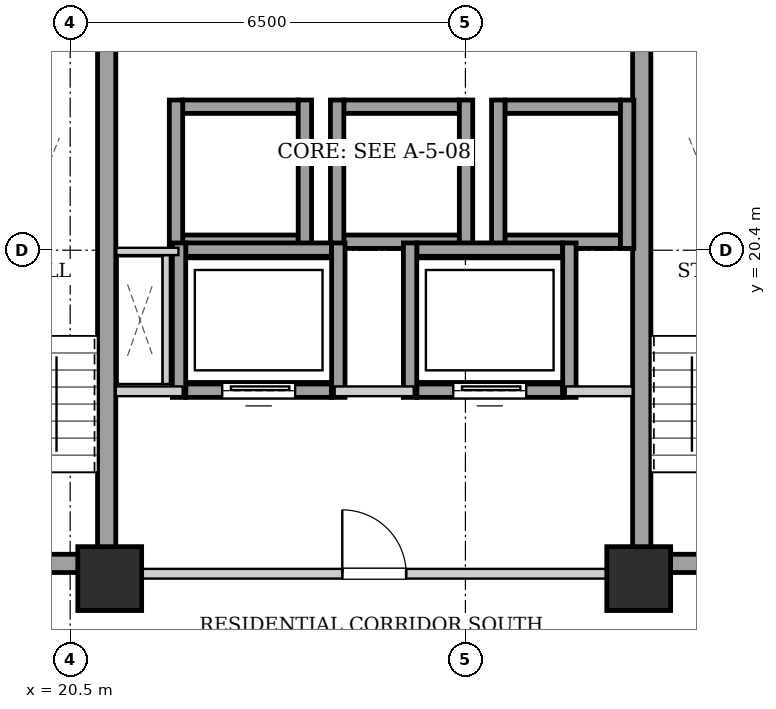
"""IFC4 building model, lengths in metres.
Left out: names, types, materials, properties, quantities, classifications, styles, units other than length and angle.
Written with IfcOpenShell. Run it as: python <this file> out.ifc"""

import sys

from ifc_helpers import new_model, si_unit, direction, frame, frame_2d, origin, origin_2d, place, context, subcontext, project, spatial, rectangle, extrude, element, fill, save


model = new_model("IFC4")
c1 = context("Model", 3, precision=1e-05, world=origin(), true_north=direction((0.0, 1.0)))
c2 = subcontext(c1, "Body", "Model", "MODEL_VIEW")
j1 = project(units=[si_unit("LENGTHUNIT", "METRE"), si_unit("PLANEANGLEUNIT", "RADIAN")], contexts=[c1])
p1 = place(None, origin())
s1 = spatial("IfcSite", under=j1, at=p1, CompositionType="ELEMENT")
p2 = place(p1, origin())
s2 = spatial("IfcBuilding", under=s1, at=p2, CompositionType="ELEMENT")
p3 = place(p2, frame((0.0, 0.0, 103.9)))
s3 = spatial("IfcBuildingStorey", under=s2, at=p3, CompositionType="ELEMENT", Elevation=103.9)
for number, where, z_axis, x_axis in (
    (1, (21.15, 15.0, 0.0), (0.0, 0.0, 1.0), (1.0, 0.0, 0.0)),
    (2, (29.85, 15.0, 0.0), (0.0, 0.0, 1.0), (1.0, 0.0, 0.0)),
):
    element("IfcColumn", number, at=place(p3, frame(where, z_axis=z_axis, x_axis=x_axis)), inside=s3, PredefinedType="COLUMN", context=c2, shape_type="SweptSolid", body=[
        extrude(rectangle(XDim=1.05, YDim=1.05, at=origin_2d()), origin(), (0.0, 0.0, 1.0), 3.2),
    ])
p4 = place(p3, frame((21.1, 15.1, 0.0), z_axis=(0.0, 0.0, 1.0), x_axis=(0.0, 1.0, 0.0)))
e3 = element("IfcWall", 3, at=p4, inside=s3, PredefinedType="SHEAR", context=c2, shape_type="SweptSolid", body=[
    extrude(rectangle(XDim=9.0, YDim=0.3, at=frame_2d((4.5, 0.0))), origin(), (0.0, 0.0, 1.0), 2.94),
])
p5 = place(p3, frame((18.1, 15.25, 0.0), z_axis=(0.0, 0.0, 1.0), x_axis=(1.0, 0.0, 0.0)))
e4 = element("IfcWall", 4, at=p5, inside=s3, PredefinedType="SHEAR", context=c2, shape_type="SweptSolid", body=[
    extrude(rectangle(XDim=2.85, YDim=0.3, at=frame_2d((1.425, 0.0))), origin(), (0.0, 0.0, 1.0), 2.94),
])
p6 = place(p5, frame((0.86, 0.0, 0.0)))
e5 = element("IfcOpeningElement", 5, at=p6, cuts=e4, PredefinedType="OPENING", context=c2, shape_type="SweptSolid", body=[
    extrude(rectangle(XDim=1.1, YDim=2.05, at=frame_2d((0.55, 1.025))), frame((0.0, 0.16, 0.0), z_axis=(0.0, -1.0, 0.0), x_axis=(1.0, 0.0, 0.0)), (0.0, 0.0, 1.0), 0.32),
])
p7 = place(p3, frame((29.9, 15.1, 0.0), z_axis=(0.0, 0.0, 1.0), x_axis=(0.0, 1.0, 0.0)))
e6 = element("IfcWall", 6, at=p7, inside=s3, PredefinedType="SHEAR", context=c2, shape_type="SweptSolid", body=[
    extrude(rectangle(XDim=9.0, YDim=0.3, at=frame_2d((4.5, 0.0))), origin(), (0.0, 0.0, 1.0), 2.94),
])
p8 = place(p3, frame((30.05, 15.25, 0.0), z_axis=(0.0, 0.0, 1.0), x_axis=(1.0, 0.0, 0.0)))
e7 = element("IfcWall", 7, at=p8, inside=s3, PredefinedType="SHEAR", context=c2, shape_type="SweptSolid", body=[
    extrude(rectangle(XDim=2.85, YDim=0.3, at=frame_2d((1.425, 0.0))), origin(), (0.0, 0.0, 1.0), 2.94),
])
p9 = place(p8, frame((0.86, 0.0, 0.0)))
e8 = element("IfcOpeningElement", 8, at=p9, cuts=e7, PredefinedType="OPENING", context=c2, shape_type="SweptSolid", body=[
    extrude(rectangle(XDim=1.1, YDim=2.05, at=frame_2d((0.55, 1.025))), frame((0.0, 0.16, 0.0), z_axis=(0.0, -1.0, 0.0), x_axis=(1.0, 0.0, 0.0)), (0.0, 0.0, 1.0), 0.32),
])
for number, where, z_axis, x_axis in (
    (9, (22.35, 20.54, 0.0), (0.0, 0.0, 1.0), (1.0, 0.0, 0.0)),
    (10, (22.35, 22.76, 0.0), (0.0, 0.0, 1.0), (1.0, 0.0, 0.0)),
):
    element("IfcWall", number, at=place(p3, frame(where, z_axis=z_axis, x_axis=x_axis)), inside=s3, PredefinedType="SHEAR", context=c2, shape_type="SweptSolid", body=[
        extrude(rectangle(XDim=1.9, YDim=0.22, at=frame_2d((0.95, 0.0))), origin(), (0.0, 0.0, 1.0), 2.94),
    ])
for number, where, z_axis, x_axis in (
    (11, (22.24, 20.43, 0.0), (0.0, 0.0, 1.0), (0.0, 1.0, 0.0)),
    (12, (24.36, 20.43, 0.0), (0.0, 0.0, 1.0), (0.0, 1.0, 0.0)),
):
    element("IfcWall", number, at=place(p3, frame(where, z_axis=z_axis, x_axis=x_axis)), inside=s3, PredefinedType="SHEAR", context=c2, shape_type="SweptSolid", body=[
        extrude(rectangle(XDim=2.44, YDim=0.22, at=frame_2d((1.22, 0.0))), origin(), (0.0, 0.0, 1.0), 2.94),
    ])
for number, where, z_axis, x_axis in (
    (13, (25.0, 20.54, 0.0), (0.0, 0.0, 1.0), (1.0, 0.0, 0.0)),
    (14, (25.0, 22.76, 0.0), (0.0, 0.0, 1.0), (1.0, 0.0, 0.0)),
):
    element("IfcWall", number, at=place(p3, frame(where, z_axis=z_axis, x_axis=x_axis)), inside=s3, PredefinedType="SHEAR", context=c2, shape_type="SweptSolid", body=[
        extrude(rectangle(XDim=1.9, YDim=0.22, at=frame_2d((0.95, 0.0))), origin(), (0.0, 0.0, 1.0), 2.94),
    ])
for number, where, z_axis, x_axis in (
    (15, (24.89, 20.43, 0.0), (0.0, 0.0, 1.0), (0.0, 1.0, 0.0)),
    (16, (27.01, 20.43, 0.0), (0.0, 0.0, 1.0), (0.0, 1.0, 0.0)),
):
    element("IfcWall", number, at=place(p3, frame(where, z_axis=z_axis, x_axis=x_axis)), inside=s3, PredefinedType="SHEAR", context=c2, shape_type="SweptSolid", body=[
        extrude(rectangle(XDim=2.44, YDim=0.22, at=frame_2d((1.22, 0.0))), origin(), (0.0, 0.0, 1.0), 2.94),
    ])
for number, where, z_axis, x_axis in (
    (17, (27.65, 20.54, 0.0), (0.0, 0.0, 1.0), (1.0, 0.0, 0.0)),
    (18, (27.65, 22.76, 0.0), (0.0, 0.0, 1.0), (1.0, 0.0, 0.0)),
):
    element("IfcWall", number, at=place(p3, frame(where, z_axis=z_axis, x_axis=x_axis)), inside=s3, PredefinedType="SHEAR", context=c2, shape_type="SweptSolid", body=[
        extrude(rectangle(XDim=1.9, YDim=0.22, at=frame_2d((0.95, 0.0))), origin(), (0.0, 0.0, 1.0), 2.94),
    ])
for number, where, z_axis, x_axis in (
    (19, (27.54, 20.43, 0.0), (0.0, 0.0, 1.0), (0.0, 1.0, 0.0)),
    (20, (29.66, 20.43, 0.0), (0.0, 0.0, 1.0), (0.0, 1.0, 0.0)),
):
    element("IfcWall", number, at=place(p3, frame(where, z_axis=z_axis, x_axis=x_axis)), inside=s3, PredefinedType="SHEAR", context=c2, shape_type="SweptSolid", body=[
        extrude(rectangle(XDim=2.44, YDim=0.22, at=frame_2d((1.22, 0.0))), origin(), (0.0, 0.0, 1.0), 2.94),
    ])
p10 = place(p3, frame((22.4, 18.09, 0.0), z_axis=(0.0, 0.0, 1.0), x_axis=(1.0, 0.0, 0.0)))
e21 = element("IfcWall", 21, at=p10, inside=s3, PredefinedType="SHEAR", context=c2, shape_type="SweptSolid", body=[
    extrude(rectangle(XDim=2.4, YDim=0.22, at=frame_2d((1.2, 0.0))), origin(), (0.0, 0.0, 1.0), 2.94),
])
p11 = place(p10, frame((0.6, 0.0, 0.0)))
e22 = element("IfcOpeningElement", 22, at=p11, cuts=e21, PredefinedType="OPENING", context=c2, shape_type="SweptSolid", body=[
    extrude(rectangle(XDim=1.2, YDim=2.15, at=frame_2d((0.6, 1.075))), frame((0.0, 0.12, 0.0), z_axis=(0.0, -1.0, 0.0), x_axis=(1.0, 0.0, 0.0)), (0.0, 0.0, 1.0), 0.24),
])
p12 = place(p3, frame((22.4, 20.41, 0.0), z_axis=(0.0, 0.0, 1.0), x_axis=(1.0, 0.0, 0.0)))
e23 = element("IfcWall", 23, at=p12, inside=s3, PredefinedType="SHEAR", context=c2, shape_type="SweptSolid", body=[
    extrude(rectangle(XDim=2.4, YDim=0.22, at=frame_2d((1.2, 0.0))), origin(), (0.0, 0.0, 1.0), 2.94),
])
for number, where, z_axis, x_axis in (
    (24, (22.29, 17.98, 0.0), (0.0, 0.0, 1.0), (0.0, 1.0, 0.0)),
    (25, (24.91, 17.98, 0.0), (0.0, 0.0, 1.0), (0.0, 1.0, 0.0)),
):
    element("IfcWall", number, at=place(p3, frame(where, z_axis=z_axis, x_axis=x_axis)), inside=s3, PredefinedType="SHEAR", context=c2, shape_type="SweptSolid", body=[
        extrude(rectangle(XDim=2.54, YDim=0.22, at=frame_2d((1.27, 0.0))), origin(), (0.0, 0.0, 1.0), 2.94),
    ])
p13 = place(p3, frame((26.2, 18.09, 0.0), z_axis=(0.0, 0.0, 1.0), x_axis=(1.0, 0.0, 0.0)))
e26 = element("IfcWall", 26, at=p13, inside=s3, PredefinedType="SHEAR", context=c2, shape_type="SweptSolid", body=[
    extrude(rectangle(XDim=2.4, YDim=0.22, at=frame_2d((1.2, 0.0))), origin(), (0.0, 0.0, 1.0), 2.94),
])
p14 = place(p13, frame((0.6, 0.0, 0.0)))
e27 = element("IfcOpeningElement", 27, at=p14, cuts=e26, PredefinedType="OPENING", context=c2, shape_type="SweptSolid", body=[
    extrude(rectangle(XDim=1.2, YDim=2.15, at=frame_2d((0.6, 1.075))), frame((0.0, 0.12, 0.0), z_axis=(0.0, -1.0, 0.0), x_axis=(1.0, 0.0, 0.0)), (0.0, 0.0, 1.0), 0.24),
])
p15 = place(p3, frame((26.2, 20.41, 0.0), z_axis=(0.0, 0.0, 1.0), x_axis=(1.0, 0.0, 0.0)))
e28 = element("IfcWall", 28, at=p15, inside=s3, PredefinedType="SHEAR", context=c2, shape_type="SweptSolid", body=[
    extrude(rectangle(XDim=2.4, YDim=0.22, at=frame_2d((1.2, 0.0))), origin(), (0.0, 0.0, 1.0), 2.94),
])
for number, where, z_axis, x_axis in (
    (29, (26.09, 17.98, 0.0), (0.0, 0.0, 1.0), (0.0, 1.0, 0.0)),
    (30, (28.71, 17.98, 0.0), (0.0, 0.0, 1.0), (0.0, 1.0, 0.0)),
):
    element("IfcWall", number, at=place(p3, frame(where, z_axis=z_axis, x_axis=x_axis)), inside=s3, PredefinedType="SHEAR", context=c2, shape_type="SweptSolid", body=[
        extrude(rectangle(XDim=2.54, YDim=0.22, at=frame_2d((1.27, 0.0))), origin(), (0.0, 0.0, 1.0), 2.94),
    ])
p16 = place(p3, frame((21.25, 15.08, 0.0), z_axis=(0.0, 0.0, 1.0), x_axis=(1.0, 0.0, 0.0)))
e31 = element("IfcWall", 31, at=p16, inside=s3, PredefinedType="PARTITIONING", context=c2, shape_type="SweptSolid", body=[
    extrude(rectangle(XDim=8.5, YDim=0.16, at=frame_2d((4.25, 0.0))), origin(), (0.0, 0.0, 1.0), 2.313),
])
p17 = place(p16, frame((3.725, 0.0, 0.0)))
e32 = element("IfcOpeningElement", 32, at=p17, cuts=e31, PredefinedType="OPENING", context=c2, shape_type="SweptSolid", body=[
    extrude(rectangle(XDim=1.05, YDim=2.05, at=frame_2d((0.525, 1.025))), frame((0.0, 0.09, 0.0), z_axis=(0.0, -1.0, 0.0), x_axis=(1.0, 0.0, 0.0)), (0.0, 0.0, 1.0), 0.18),
])
p18 = place(p3, frame((21.25, 18.08, 0.0), z_axis=(0.0, 0.0, 1.0), x_axis=(1.0, 0.0, 0.0)))
e33 = element("IfcWall", 33, at=p18, inside=s3, PredefinedType="PARTITIONING", context=c2, shape_type="SweptSolid", body=[
    extrude(rectangle(XDim=1.1, YDim=0.16, at=frame_2d((0.55, 0.0))), origin(), (0.0, 0.0, 1.0), 2.94),
])
p19 = place(p3, frame((24.85, 18.08, 0.0), z_axis=(0.0, 0.0, 1.0), x_axis=(1.0, 0.0, 0.0)))
e34 = element("IfcWall", 34, at=p19, inside=s3, PredefinedType="PARTITIONING", context=c2, shape_type="SweptSolid", body=[
    extrude(rectangle(XDim=1.3, YDim=0.16, at=frame_2d((0.65, 0.0))), origin(), (0.0, 0.0, 1.0), 2.94),
])
p20 = place(p3, frame((28.65, 18.08, 0.0), z_axis=(0.0, 0.0, 1.0), x_axis=(1.0, 0.0, 0.0)))
e35 = element("IfcWall", 35, at=p20, inside=s3, PredefinedType="PARTITIONING", context=c2, shape_type="SweptSolid", body=[
    extrude(rectangle(XDim=1.1, YDim=0.16, at=frame_2d((0.55, 0.0))), origin(), (0.0, 0.0, 1.0), 2.94),
])
p21 = place(p3, frame((22.08, 18.2, 0.0), z_axis=(0.0, 0.0, 1.0), x_axis=(0.0, 1.0, 0.0)))
e36 = element("IfcWall", 36, at=p21, inside=s3, PredefinedType="PARTITIONING", context=c2, shape_type="SweptSolid", body=[
    extrude(rectangle(XDim=2.12, YDim=0.12, at=frame_2d((1.06, 0.0))), origin(), (0.0, 0.0, 1.0), 2.94),
])
p22 = place(p3, frame((22.28, 20.38, 0.0), z_axis=(0.0, 0.0, 1.0), x_axis=(-1.0, 0.0, 0.0)))
e37 = element("IfcWall", 37, at=p22, inside=s3, PredefinedType="PARTITIONING", context=c2, shape_type="SweptSolid", body=[
    extrude(rectangle(XDim=1.02, YDim=0.12, at=frame_2d((0.51, 0.0))), origin(), (0.0, 0.0, 1.0), 2.94),
])
p23 = place(p11, origin())
e38 = element("IfcDoor", 38, at=p23, inside=s3, OperationType="SLIDING_TO_LEFT", PredefinedType="DOOR", context=c2, shape_type="SweptSolid", body=[
    extrude(rectangle(XDim=1.2, YDim=2.15, at=frame_2d((0.6, 1.075))), frame((0.0, 0.025, 0.0), z_axis=(0.0, -1.0, 0.0), x_axis=(1.0, 0.0, 0.0)), (0.0, 0.0, 1.0), 0.05),
])
fill(e22, e38)
p24 = place(p14, origin())
e39 = element("IfcDoor", 39, at=p24, inside=s3, OperationType="SLIDING_TO_LEFT", PredefinedType="DOOR", context=c2, shape_type="SweptSolid", body=[
    extrude(rectangle(XDim=1.2, YDim=2.15, at=frame_2d((0.6, 1.075))), frame((0.0, 0.025, 0.0), z_axis=(0.0, -1.0, 0.0), x_axis=(1.0, 0.0, 0.0)), (0.0, 0.0, 1.0), 0.05),
])
fill(e27, e39)
p25 = place(p17, origin())
e40 = element("IfcDoor", 40, at=p25, inside=s3, OperationType="SINGLE_SWING_LEFT", PredefinedType="DOOR", context=c2, shape_type="SweptSolid", body=[
    extrude(rectangle(XDim=1.05, YDim=2.05, at=frame_2d((0.525, 1.025))), frame((0.0, 0.025, 0.0), z_axis=(0.0, -1.0, 0.0), x_axis=(1.0, 0.0, 0.0)), (0.0, 0.0, 1.0), 0.05),
])
fill(e32, e40)
save(model, sys.argv[1])
